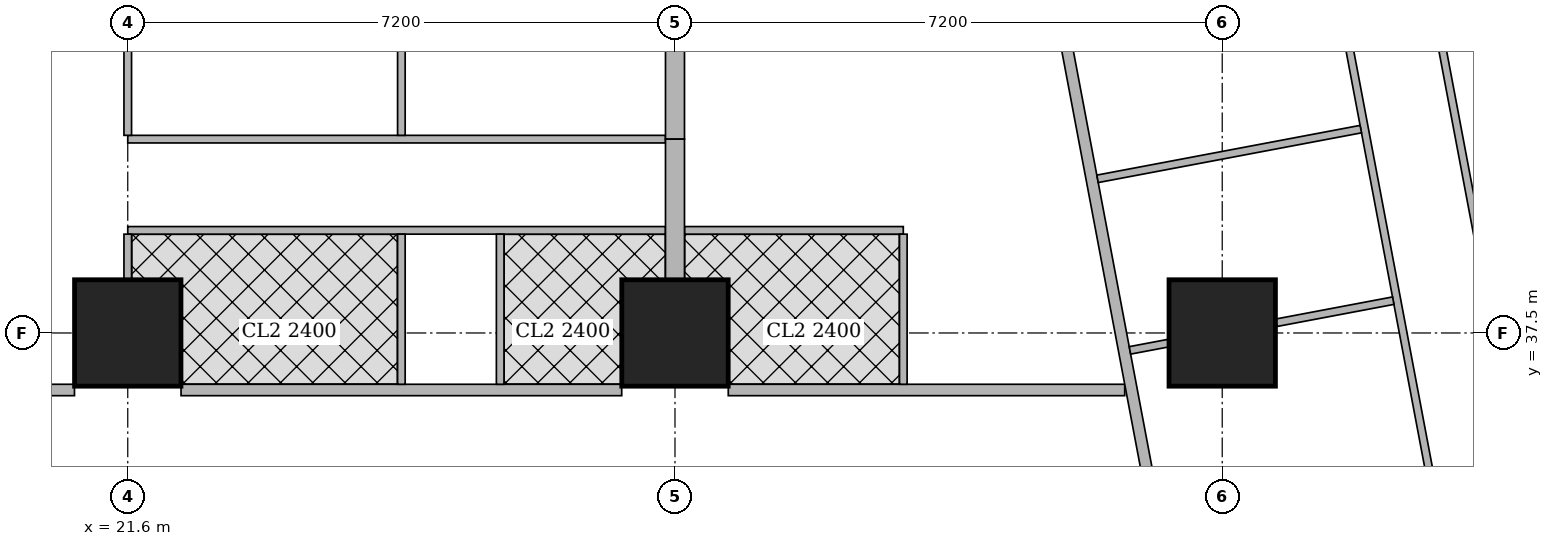
"""IFC4 building model, lengths in metres.
Left out: names, types, materials, properties, quantities, classifications, styles, units other than length and angle.
Written with IfcOpenShell. Run it as: python <this file> out.ifc"""

import sys

from ifc_helpers import new_model, si_unit, direction, frame, frame_2d, origin, origin_2d, place, context, subcontext, project, spatial, rectangle, extrude, element, fill, save


model = new_model("IFC4")
c1 = context("Model", 3, precision=1e-05, world=origin(), true_north=direction((0.0, 1.0)))
c2 = subcontext(c1, "Body", "Model", "MODEL_VIEW")
j1 = project(units=[si_unit("LENGTHUNIT", "METRE"), si_unit("PLANEANGLEUNIT", "RADIAN")], contexts=[c1])
p1 = place(None, origin())
s1 = spatial("IfcSite", under=j1, at=p1, CompositionType="ELEMENT")
p2 = place(p1, origin())
s2 = spatial("IfcBuilding", under=s1, at=p2, CompositionType="ELEMENT")
p3 = place(p2, frame((0.0, 0.0, 274.1)))
s3 = spatial("IfcBuildingStorey", under=s2, at=p3, CompositionType="ELEMENT", Elevation=274.1)
for number, where, z_axis, x_axis in (
    (1, (21.6, 37.5, 0.0), (0.0, 0.0, 1.0), (1.0, 0.0, 0.0)),
    (2, (28.8, 37.5, 0.0), (0.0, 0.0, 1.0), (1.0, 0.0, 0.0)),
    (3, (36.0, 37.5, 0.0), (0.0, 0.0, 1.0), (1.0, 0.0, 0.0)),
):
    element("IfcColumn", number, at=place(p3, frame(where, z_axis=z_axis, x_axis=x_axis)), inside=s3, PredefinedType="COLUMN", context=c2, shape_type="SweptSolid", body=[
        extrude(rectangle(XDim=1.4, YDim=1.4, at=origin_2d()), origin(), (0.0, 0.0, 1.0), 3.75),
    ])
p4 = place(p3, frame((16.001, 36.75, 0.0), z_axis=(0.0, 0.0, 1.0), x_axis=(1.0, 0.0, 0.0)))
e4 = element("IfcWall", 4, at=p4, inside=s3, PredefinedType="SOLIDWALL", context=c2, shape_type="SweptSolid", body=[
    extrude(rectangle(XDim=4.898, YDim=0.15, at=frame_2d((2.449, 0.0))), origin(), (0.0, 0.0, 1.0), 3.5),
])
p5 = place(p4, frame((1.074, 0.0, 0.0)))
e5 = element("IfcOpeningElement", 5, at=p5, cuts=e4, PredefinedType="OPENING", context=c2, shape_type="SweptSolid", body=[
    extrude(rectangle(XDim=1.0, YDim=2.1, at=frame_2d((0.5, 1.05))), frame((0.0, 0.085, 0.0), z_axis=(0.0, -1.0, 0.0), x_axis=(1.0, 0.0, 0.0)), (0.0, 0.0, 1.0), 0.17),
])
p6 = place(p3, frame((22.301, 36.75, 0.0), z_axis=(0.0, 0.0, 1.0), x_axis=(1.0, 0.0, 0.0)))
e6 = element("IfcWall", 6, at=p6, inside=s3, PredefinedType="SOLIDWALL", context=c2, shape_type="SweptSolid", body=[
    extrude(rectangle(XDim=5.798, YDim=0.15, at=frame_2d((2.899, 0.0))), origin(), (0.0, 0.0, 1.0), 3.5),
])
p7 = place(p3, frame((29.501, 36.75, 0.0), z_axis=(0.0, 0.0, 1.0), x_axis=(1.0, 0.0, 0.0)))
e7 = element("IfcWall", 7, at=p7, inside=s3, PredefinedType="SOLIDWALL", context=c2, shape_type="SweptSolid", body=[
    extrude(rectangle(XDim=5.216, YDim=0.15, at=frame_2d((2.608, 0.0))), origin(), (0.0, 0.0, 1.0), 3.5),
])
p8 = place(p7, frame((3.305, 0.0, 0.0)))
e8 = element("IfcOpeningElement", 8, at=p8, cuts=e7, PredefinedType="OPENING", context=c2, shape_type="SweptSolid", body=[
    extrude(rectangle(XDim=1.0, YDim=2.1, at=frame_2d((0.5, 1.05))), frame((0.0, 0.085, 0.0), z_axis=(0.0, -1.0, 0.0), x_axis=(1.0, 0.0, 0.0)), (0.0, 0.0, 1.0), 0.17),
])
p9 = place(p3, frame((33.781, 42.186, 0.0), z_axis=(0.0, 0.0, 1.0), x_axis=(0.185593518645, -0.9826266055, 0.0)))
e9 = element("IfcWall", 9, at=p9, inside=s3, PredefinedType="SOLIDWALL", context=c2, shape_type="SweptSolid", body=[
    extrude(rectangle(XDim=35.961, YDim=0.15, at=frame_2d((17.98, 0.0))), origin(), (0.0, 0.0, 1.0), 2.5),
])
p10 = place(p9, frame((11.76, 0.0, 0.0)))
e10 = element("IfcOpeningElement", 10, at=p10, cuts=e9, PredefinedType="OPENING", context=c2, shape_type="SweptSolid", body=[
    extrude(rectangle(XDim=1.0, YDim=2.1, at=frame_2d((0.5, 1.05))), frame((0.0, 0.085, 0.0), z_axis=(0.0, -1.0, 0.0), x_axis=(1.0, 0.0, 0.0)), (0.0, 0.0, 1.0), 0.17),
])
p11 = place(p9, frame((15.576, 0.0, 0.0)))
e11 = element("IfcOpeningElement", 11, at=p11, cuts=e9, PredefinedType="OPENING", context=c2, shape_type="SweptSolid", body=[
    extrude(rectangle(XDim=1.0, YDim=2.1, at=frame_2d((0.5, 1.05))), frame((0.0, 0.085, 0.0), z_axis=(0.0, -1.0, 0.0), x_axis=(1.0, 0.0, 0.0)), (0.0, 0.0, 1.0), 0.17),
])
p12 = place(p9, frame((30.502, 0.0, 0.0)))
e12 = element("IfcOpeningElement", 12, at=p12, cuts=e9, PredefinedType="OPENING", context=c2, shape_type="SweptSolid", body=[
    extrude(rectangle(XDim=1.0, YDim=2.1, at=frame_2d((0.5, 1.05))), frame((0.0, 0.085, 0.0), z_axis=(0.0, -1.0, 0.0), x_axis=(1.0, 0.0, 0.0)), (0.0, 0.0, 1.0), 0.17),
])
p13 = place(p3, frame((38.744, 42.045, 0.0), z_axis=(0.0, 0.0, 1.0), x_axis=(0.185588352162, -0.982627581305, 0.0)))
e13 = element("IfcWall", 13, at=p13, inside=s3, PredefinedType="PARTITIONING", context=c2, shape_type="SweptSolid", body=[
    extrude(rectangle(XDim=9.241, YDim=0.1, at=frame_2d((4.621, 0.0))), origin(), (0.0, 0.0, 1.0), 3.5),
])
p14 = place(p13, frame((8.191, 0.0, 0.0)))
e14 = element("IfcOpeningElement", 14, at=p14, cuts=e13, PredefinedType="OPENING", context=c2, shape_type="SweptSolid", body=[
    extrude(rectangle(XDim=0.9, YDim=2.1, at=frame_2d((0.45, 1.05))), frame((0.0, 0.06, 0.0), z_axis=(0.0, -1.0, 0.0), x_axis=(1.0, 0.0, 0.0)), (0.0, 0.0, 1.0), 0.12),
])
p15 = place(p13, frame((4.215, 0.0, 0.0)))
e15 = element("IfcOpeningElement", 15, at=p15, cuts=e13, PredefinedType="OPENING", context=c2, shape_type="SweptSolid", body=[
    extrude(rectangle(XDim=0.9, YDim=2.1, at=frame_2d((0.45, 1.05))), frame((0.0, 0.06, 0.0), z_axis=(0.0, -1.0, 0.0), x_axis=(1.0, 0.0, 0.0)), (0.0, 0.0, 1.0), 0.12),
])
p16 = place(p3, frame((37.51, 42.109, 0.0), z_axis=(0.0, 0.0, 1.0), x_axis=(0.185659798122, -0.982614084654, 0.0)))
e16 = element("IfcWall", 16, at=p16, inside=s3, PredefinedType="PARTITIONING", context=c2, shape_type="SweptSolid", body=[
    extrude(rectangle(XDim=9.534, YDim=0.1, at=frame_2d((4.767, 0.0))), origin(), (0.0, 0.0, 1.0), 3.5),
])
p17 = place(p16, frame((8.109, 0.0, 0.0)))
e17 = element("IfcOpeningElement", 17, at=p17, cuts=e16, PredefinedType="OPENING", context=c2, shape_type="SweptSolid", body=[
    extrude(rectangle(XDim=0.9, YDim=2.1, at=frame_2d((0.45, 1.05))), frame((0.0, 0.06, 0.0), z_axis=(0.0, -1.0, 0.0), x_axis=(1.0, 0.0, 0.0)), (0.0, 0.0, 1.0), 0.12),
])
p18 = place(p16, frame((2.65, 0.0, 0.0)))
e18 = element("IfcOpeningElement", 18, at=p18, cuts=e16, PredefinedType="OPENING", context=c2, shape_type="SweptSolid", body=[
    extrude(rectangle(XDim=0.9, YDim=2.1, at=frame_2d((0.45, 1.05))), frame((0.0, 0.06, 0.0), z_axis=(0.0, -1.0, 0.0), x_axis=(1.0, 0.0, 0.0)), (0.0, 0.0, 1.0), 0.12),
])
p19 = place(p16, frame((5.44, 0.0, 0.0)))
e19 = element("IfcOpeningElement", 19, at=p19, cuts=e16, PredefinedType="OPENING", context=c2, shape_type="SweptSolid", body=[
    extrude(rectangle(XDim=0.9, YDim=2.1, at=frame_2d((0.45, 1.05))), frame((0.0, 0.06, 0.0), z_axis=(0.0, -1.0, 0.0), x_axis=(1.0, 0.0, 0.0)), (0.0, 0.0, 1.0), 0.12),
])
p20 = place(p3, frame((37.823, 40.182, 0.0), z_axis=(0.0, 0.0, 1.0), x_axis=(-0.98263926043, -0.185526504472, 0.0)))
e20 = element("IfcWall", 20, at=p20, inside=s3, PredefinedType="PARTITIONING", context=c2, shape_type="SweptSolid", body=[
    extrude(rectangle(XDim=3.524, YDim=0.1, at=frame_2d((1.762, 0.0))), origin(), (0.0, 0.0, 1.0), 3.5),
])
p21 = place(p3, frame((38.25, 37.925, 0.0), z_axis=(0.0, 0.0, 1.0), x_axis=(-0.982610209589, -0.185680305934, 0.0)))
e21 = element("IfcWall", 21, at=p21, inside=s3, PredefinedType="PARTITIONING", context=c2, shape_type="SweptSolid", body=[
    extrude(rectangle(XDim=1.567, YDim=0.1, at=frame_2d((0.784, 0.0))), origin(), (0.0, 0.0, 1.0), 3.5),
])
p22 = place(p3, frame((35.29, 37.366, 0.0), z_axis=(0.0, 0.0, 1.0), x_axis=(-0.982715597703, -0.185121727606, 0.0)))
e22 = element("IfcWall", 22, at=p22, inside=s3, PredefinedType="PARTITIONING", context=c2, shape_type="SweptSolid", body=[
    extrude(rectangle(XDim=0.513, YDim=0.1, at=frame_2d((0.256, 0.0))), origin(), (0.0, 0.0, 1.0), 3.5),
])
p23 = place(p3, frame((21.6, 40.05, 0.0), z_axis=(0.0, 0.0, 1.0), x_axis=(1.0, 0.0, 0.0)))
e23 = element("IfcWall", 23, at=p23, inside=s3, PredefinedType="PARTITIONING", context=c2, shape_type="SweptSolid", body=[
    extrude(rectangle(XDim=7.075, YDim=0.1, at=frame_2d((3.538, 0.0))), origin(), (0.0, 0.0, 1.0), 3.5),
])
p24 = place(p23, frame((0.2, 0.0, 0.0)))
e24 = element("IfcOpeningElement", 24, at=p24, cuts=e23, PredefinedType="OPENING", context=c2, shape_type="SweptSolid", body=[
    extrude(rectangle(XDim=0.9, YDim=2.1, at=frame_2d((0.45, 1.05))), frame((0.0, 0.06, 0.0), z_axis=(0.0, -1.0, 0.0), x_axis=(1.0, 0.0, 0.0)), (0.0, 0.0, 1.0), 0.12),
])
p25 = place(p23, frame((3.8, 0.0, 0.0)))
e25 = element("IfcOpeningElement", 25, at=p25, cuts=e23, PredefinedType="OPENING", context=c2, shape_type="SweptSolid", body=[
    extrude(rectangle(XDim=0.9, YDim=2.1, at=frame_2d((0.45, 1.05))), frame((0.0, 0.06, 0.0), z_axis=(0.0, -1.0, 0.0), x_axis=(1.0, 0.0, 0.0)), (0.0, 0.0, 1.0), 0.12),
])
p26 = place(p3, frame((21.6, 38.85, 0.0), z_axis=(0.0, 0.0, 1.0), x_axis=(1.0, 0.0, 0.0)))
e26 = element("IfcWall", 26, at=p26, inside=s3, PredefinedType="PARTITIONING", context=c2, shape_type="SweptSolid", body=[
    extrude(rectangle(XDim=7.075, YDim=0.1, at=frame_2d((3.538, 0.0))), origin(), (0.0, 0.0, 1.0), 3.5),
])
p27 = place(p26, frame((1.35, 0.0, 0.0)))
e27 = element("IfcOpeningElement", 27, at=p27, cuts=e26, PredefinedType="OPENING", context=c2, shape_type="SweptSolid", body=[
    extrude(rectangle(XDim=0.9, YDim=2.1, at=frame_2d((0.45, 1.05))), frame((0.0, 0.06, 0.0), z_axis=(0.0, -1.0, 0.0), x_axis=(1.0, 0.0, 0.0)), (0.0, 0.0, 1.0), 0.12),
])
p28 = place(p26, frame((5.55, 0.0, 0.0)))
e28 = element("IfcOpeningElement", 28, at=p28, cuts=e26, PredefinedType="OPENING", context=c2, shape_type="SweptSolid", body=[
    extrude(rectangle(XDim=0.9, YDim=2.1, at=frame_2d((0.45, 1.05))), frame((0.0, 0.06, 0.0), z_axis=(0.0, -1.0, 0.0), x_axis=(1.0, 0.0, 0.0)), (0.0, 0.0, 1.0), 0.12),
])
p29 = place(p3, frame((21.6, 40.1, 0.0), z_axis=(0.0, 0.0, 1.0), x_axis=(0.0, 1.0, 0.0)))
e29 = element("IfcWall", 29, at=p29, inside=s3, PredefinedType="PARTITIONING", context=c2, shape_type="SweptSolid", body=[
    extrude(rectangle(XDim=1.699, YDim=0.1, at=frame_2d((0.85, 0.0))), origin(), (0.0, 0.0, 1.0), 3.5),
])
p30 = place(p3, frame((25.2, 40.1, 0.0), z_axis=(0.0, 0.0, 1.0), x_axis=(0.0, 1.0, 0.0)))
e30 = element("IfcWall", 30, at=p30, inside=s3, PredefinedType="PARTITIONING", context=c2, shape_type="SweptSolid", body=[
    extrude(rectangle(XDim=3.75, YDim=0.1, at=frame_2d((1.875, 0.0))), origin(), (0.0, 0.0, 1.0), 2.05),
])
p31 = place(p3, frame((21.6, 38.201, 0.0), z_axis=(0.0, 0.0, 1.0), x_axis=(0.0, 1.0, 0.0)))
e31 = element("IfcWall", 31, at=p31, inside=s3, PredefinedType="PARTITIONING", context=c2, shape_type="SweptSolid", body=[
    extrude(rectangle(XDim=0.599, YDim=0.1, at=frame_2d((0.3, 0.0))), origin(), (0.0, 0.0, 1.0), 3.5),
])
p32 = place(p3, frame((25.2, 36.825, 0.0), z_axis=(0.0, 0.0, 1.0), x_axis=(0.0, 1.0, 0.0)))
e32 = element("IfcWall", 32, at=p32, inside=s3, PredefinedType="PARTITIONING", context=c2, shape_type="SweptSolid", body=[
    extrude(rectangle(XDim=1.975, YDim=0.1, at=frame_2d((0.988, 0.0))), origin(), (0.0, 0.0, 1.0), 3.5),
])
p33 = place(p3, frame((26.5, 36.825, 0.0), z_axis=(0.0, 0.0, 1.0), x_axis=(0.0, 1.0, 0.0)))
e33 = element("IfcWall", 33, at=p33, inside=s3, PredefinedType="PARTITIONING", context=c2, shape_type="SweptSolid", body=[
    extrude(rectangle(XDim=1.975, YDim=0.1, at=frame_2d((0.988, 0.0))), origin(), (0.0, 0.0, 1.0), 3.5),
])
p34 = place(p33, frame((0.525, 0.0, 0.0)))
e34 = element("IfcOpeningElement", 34, at=p34, cuts=e33, PredefinedType="OPENING", context=c2, shape_type="SweptSolid", body=[
    extrude(rectangle(XDim=0.9, YDim=2.1, at=frame_2d((0.45, 1.05))), frame((0.0, 0.06, 0.0), z_axis=(0.0, -1.0, 0.0), x_axis=(1.0, 0.0, 0.0)), (0.0, 0.0, 1.0), 0.12),
])
p35 = place(p3, frame((28.925, 38.85, 0.0), z_axis=(0.0, 0.0, 1.0), x_axis=(1.0, 0.0, 0.0)))
e35 = element("IfcWall", 35, at=p35, inside=s3, PredefinedType="PARTITIONING", context=c2, shape_type="SweptSolid", body=[
    extrude(rectangle(XDim=2.879, YDim=0.1, at=frame_2d((1.439, 0.0))), origin(), (0.0, 0.0, 1.0), 3.5),
])
p36 = place(p35, frame((0.925, 0.0, 0.0)))
e36 = element("IfcOpeningElement", 36, at=p36, cuts=e35, PredefinedType="OPENING", context=c2, shape_type="SweptSolid", body=[
    extrude(rectangle(XDim=0.9, YDim=2.1, at=frame_2d((0.45, 1.05))), frame((0.0, 0.06, 0.0), z_axis=(0.0, -1.0, 0.0), x_axis=(1.0, 0.0, 0.0)), (0.0, 0.0, 1.0), 0.12),
])
p37 = place(p3, frame((31.804, 36.825, 0.0), z_axis=(0.0, 0.0, 1.0), x_axis=(0.0, 1.0, 0.0)))
e37 = element("IfcWall", 37, at=p37, inside=s3, PredefinedType="PARTITIONING", context=c2, shape_type="SweptSolid", body=[
    extrude(rectangle(XDim=1.975, YDim=0.1, at=frame_2d((0.988, 0.0))), origin(), (0.0, 0.0, 1.0), 3.5),
])
p38 = place(p3, frame((28.8, 40.05, 0.0), z_axis=(0.0, 0.0, 1.0), x_axis=(0.0, 1.0, 0.0)))
e38 = element("IfcWall", 38, at=p38, inside=s3, PredefinedType="SOLIDWALL", context=c2, shape_type="SweptSolid", body=[
    extrude(rectangle(XDim=1.749, YDim=0.25, at=frame_2d((0.875, 0.0))), origin(), (0.0, 0.0, 1.0), 3.5),
])
p39 = place(p3, frame((28.8, 38.201, 0.0), z_axis=(0.0, 0.0, 1.0), x_axis=(0.0, 1.0, 0.0)))
e39 = element("IfcWall", 39, at=p39, inside=s3, PredefinedType="SOLIDWALL", context=c2, shape_type="SweptSolid", body=[
    extrude(rectangle(XDim=1.849, YDim=0.25, at=frame_2d((0.925, 0.0))), origin(), (0.0, 0.0, 1.0), 3.5),
])
p40 = place(p18, origin())
e40 = element("IfcDoor", 40, at=p40, inside=s3, OperationType="SINGLE_SWING_RIGHT", PredefinedType="DOOR", context=c2, shape_type="SweptSolid", body=[
    extrude(rectangle(XDim=0.9, YDim=2.1, at=frame_2d((0.45, 1.05))), frame((0.0, 0.025, 0.0), z_axis=(0.0, -1.0, 0.0), x_axis=(1.0, 0.0, 0.0)), (0.0, 0.0, 1.0), 0.05),
])
fill(e18, e40)
p41 = place(p19, origin())
e41 = element("IfcDoor", 41, at=p41, inside=s3, OperationType="SINGLE_SWING_RIGHT", PredefinedType="DOOR", context=c2, shape_type="SweptSolid", body=[
    extrude(rectangle(XDim=0.9, YDim=2.1, at=frame_2d((0.45, 1.05))), frame((0.0, 0.025, 0.0), z_axis=(0.0, -1.0, 0.0), x_axis=(1.0, 0.0, 0.0)), (0.0, 0.0, 1.0), 0.05),
])
fill(e19, e41)
p42 = place(p24, origin())
e42 = element("IfcDoor", 42, at=p42, inside=s3, OperationType="SINGLE_SWING_LEFT", PredefinedType="DOOR", context=c2, shape_type="SweptSolid", body=[
    extrude(rectangle(XDim=0.9, YDim=2.1, at=frame_2d((0.45, 1.05))), frame((0.0, 0.025, 0.0), z_axis=(0.0, -1.0, 0.0), x_axis=(1.0, 0.0, 0.0)), (0.0, 0.0, 1.0), 0.05),
])
fill(e24, e42)
p43 = place(p25, origin())
e43 = element("IfcDoor", 43, at=p43, inside=s3, OperationType="SINGLE_SWING_LEFT", PredefinedType="DOOR", context=c2, shape_type="SweptSolid", body=[
    extrude(rectangle(XDim=0.9, YDim=2.1, at=frame_2d((0.45, 1.05))), frame((0.0, 0.025, 0.0), z_axis=(0.0, -1.0, 0.0), x_axis=(1.0, 0.0, 0.0)), (0.0, 0.0, 1.0), 0.05),
])
fill(e25, e43)
p44 = place(p27, origin())
e44 = element("IfcDoor", 44, at=p44, inside=s3, OperationType="SINGLE_SWING_RIGHT", PredefinedType="DOOR", context=c2, shape_type="SweptSolid", body=[
    extrude(rectangle(XDim=0.9, YDim=2.1, at=frame_2d((0.45, 1.05))), frame((0.0, 0.025, 0.0), z_axis=(0.0, -1.0, 0.0), x_axis=(1.0, 0.0, 0.0)), (0.0, 0.0, 1.0), 0.05),
])
fill(e27, e44)
p45 = place(p28, origin())
e45 = element("IfcDoor", 45, at=p45, inside=s3, OperationType="SINGLE_SWING_LEFT", PredefinedType="DOOR", context=c2, shape_type="SweptSolid", body=[
    extrude(rectangle(XDim=0.9, YDim=2.1, at=frame_2d((0.45, 1.05))), frame((0.0, 0.025, 0.0), z_axis=(0.0, -1.0, 0.0), x_axis=(1.0, 0.0, 0.0)), (0.0, 0.0, 1.0), 0.05),
])
fill(e28, e45)
p46 = place(p34, origin())
e46 = element("IfcDoor", 46, at=p46, inside=s3, OperationType="SINGLE_SWING_LEFT", PredefinedType="DOOR", context=c2, shape_type="SweptSolid", body=[
    extrude(rectangle(XDim=0.9, YDim=2.1, at=frame_2d((0.45, 1.05))), frame((0.0, 0.025, 0.0), z_axis=(0.0, -1.0, 0.0), x_axis=(1.0, 0.0, 0.0)), (0.0, 0.0, 1.0), 0.05),
])
fill(e34, e46)
p47 = place(p36, origin())
e47 = element("IfcDoor", 47, at=p47, inside=s3, OperationType="SINGLE_SWING_RIGHT", PredefinedType="DOOR", context=c2, shape_type="SweptSolid", body=[
    extrude(rectangle(XDim=0.9, YDim=2.1, at=frame_2d((0.45, 1.05))), frame((0.0, 0.025, 0.0), z_axis=(0.0, -1.0, 0.0), x_axis=(1.0, 0.0, 0.0)), (0.0, 0.0, 1.0), 0.05),
])
fill(e36, e47)
p48 = place(p8, origin())
e48 = element("IfcDoor", 48, at=p48, inside=s3, OperationType="SINGLE_SWING_RIGHT", PredefinedType="DOOR", context=c2, shape_type="SweptSolid", body=[
    extrude(rectangle(XDim=1.0, YDim=2.1, at=frame_2d((0.5, 1.05))), frame((0.0, 0.025, 0.0), z_axis=(0.0, -1.0, 0.0), x_axis=(1.0, 0.0, 0.0)), (0.0, 0.0, 1.0), 0.05),
])
fill(e8, e48)
save(model, sys.argv[1])
